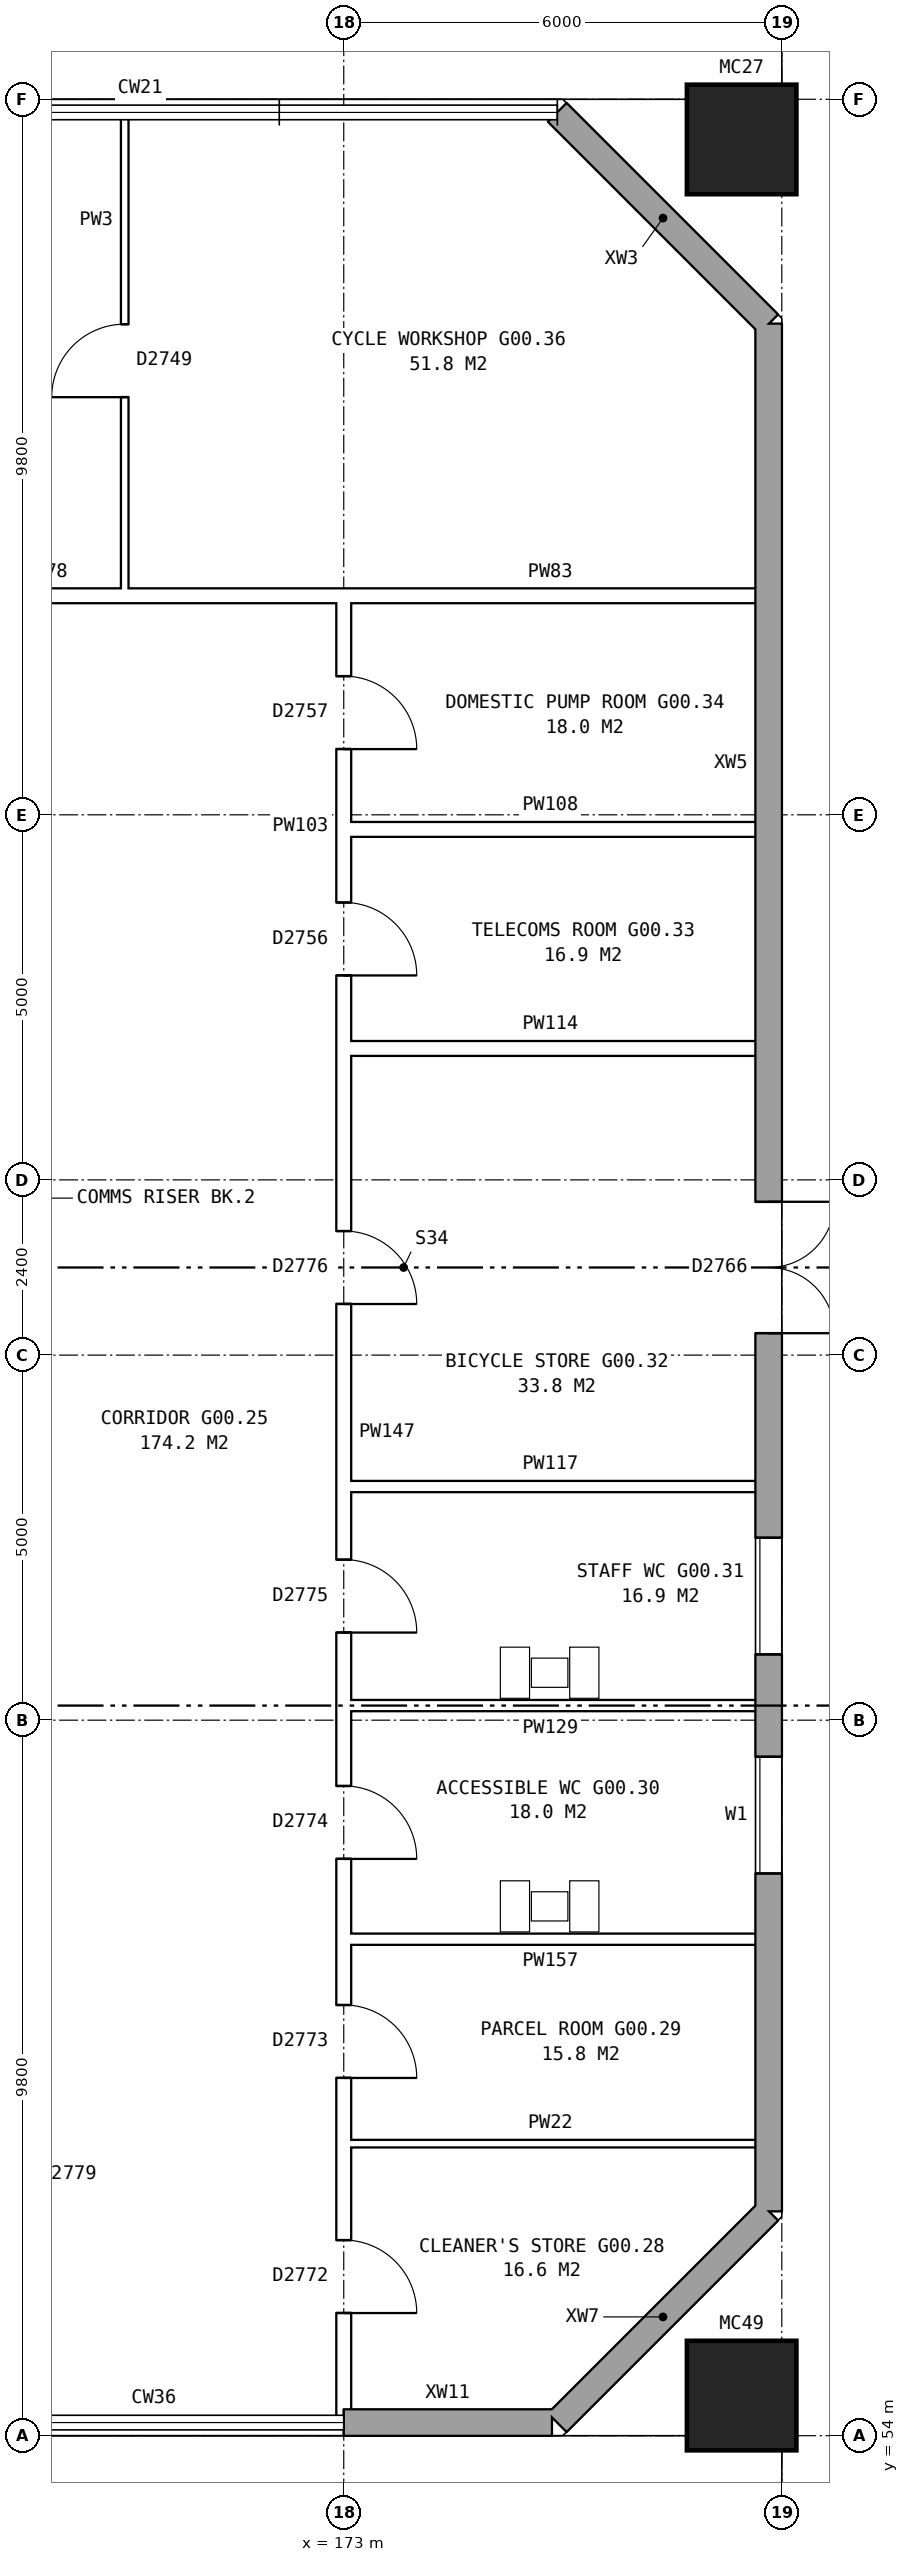
"""IFC4 building model, lengths in metres.
Left out: names, types, materials, properties, quantities, classifications, styles, units other than length and angle.
Written with IfcOpenShell. Run it as: python <this file> out.ifc"""

import sys

from ifc_helpers import new_model, si_unit, direction, frame, frame_2d, origin, origin_2d, place, context, subcontext, project, spatial, rectangle, hollow_rectangle, extrude, element, fill, save


model = new_model("IFC4")
c1 = context("Model", 3, precision=1e-05, world=origin(), true_north=direction((0.0, 1.0)))
c2 = subcontext(c1, "Body", "Model", "MODEL_VIEW")
j1 = project(units=[si_unit("LENGTHUNIT", "METRE"), si_unit("PLANEANGLEUNIT", "RADIAN")], contexts=[c1])
p1 = place(None, origin())
s1 = spatial("IfcSite", under=j1, at=p1, CompositionType="ELEMENT")
p2 = place(p1, origin())
s2 = spatial("IfcBuilding", under=s1, at=p2, CompositionType="ELEMENT")
p3 = place(p2, origin())
s3 = spatial("IfcBuildingStorey", under=s2, at=p3, CompositionType="ELEMENT", Elevation=0.0)
for number, where, z_axis, x_axis in (
    (1, (178.45, 54.55, -0.35), (0.0, 0.0, 1.0), (1.0, 0.0, 0.0)),
    (2, (178.45, 85.45, -0.35), (0.0, 0.0, 1.0), (1.0, 0.0, 0.0)),
):
    element("IfcColumn", number, at=place(p3, frame(where, z_axis=z_axis, x_axis=x_axis)), inside=s3, PredefinedType="COLUMN", context=c2, shape_type="SweptSolid", body=[
        extrude(hollow_rectangle(XDim=1.5, YDim=1.5, WallThickness=0.08, at=origin_2d()), origin(), (0.0, 0.0, 1.0), 5.85),
    ])
p4 = place(p3, frame((173.0, 54.18, 0.0), z_axis=(0.0, 0.0, 1.0), x_axis=(1.0, 0.0, 0.0)))
e3 = element("IfcWall", 3, at=p4, inside=s3, PredefinedType="STANDARD", context=c2, shape_type="SweptSolid", body=[
    extrude(rectangle(XDim=2.85, YDim=0.36, at=frame_2d((1.425, 0.0))), origin(), (0.0, 0.0, 1.0), 5.2),
])
p5 = place(p3, frame((175.925, 54.18, 0.0), z_axis=(0.0, 0.0, 1.0), x_axis=(0.707106781187, 0.707106781187, 0.0)))
e4 = element("IfcWall", 4, at=p5, inside=s3, PredefinedType="STANDARD", context=c2, shape_type="SweptSolid", body=[
    extrude(rectangle(XDim=4.094, YDim=0.36, at=frame_2d((2.047, 0.0))), origin(), (0.0, 0.0, 1.0), 5.2),
])
p6 = place(p3, frame((178.82, 57.075, 0.0), z_axis=(0.0, 0.0, 1.0), x_axis=(0.0, 1.0, 0.0)))
e5 = element("IfcWall", 5, at=p6, inside=s3, PredefinedType="STANDARD", context=c2, shape_type="SweptSolid", body=[
    extrude(rectangle(XDim=25.851, YDim=0.36, at=frame_2d((12.925, 0.0))), origin(), (0.0, 0.0, 1.0), 5.2),
])
p7 = place(p6, frame((4.625, 0.0, 0.8)))
e6 = element("IfcOpeningElement", 6, at=p7, cuts=e5, PredefinedType="OPENING", context=c2, shape_type="SweptSolid", body=[
    extrude(rectangle(XDim=1.6, YDim=1.8, at=frame_2d((0.8, 0.9))), frame((0.0, 0.19, 0.0), z_axis=(0.0, -1.0, 0.0), x_axis=(1.0, 0.0, 0.0)), (0.0, 0.0, 1.0), 0.38),
])
p8 = place(p6, frame((7.625, 0.0, 0.8)))
e7 = element("IfcOpeningElement", 7, at=p8, cuts=e5, PredefinedType="OPENING", context=c2, shape_type="SweptSolid", body=[
    extrude(rectangle(XDim=1.6, YDim=1.8, at=frame_2d((0.8, 0.9))), frame((0.0, 0.19, 0.0), z_axis=(0.0, -1.0, 0.0), x_axis=(1.0, 0.0, 0.0)), (0.0, 0.0, 1.0), 0.38),
])
p9 = place(p6, frame((12.025, 0.0, 0.0)))
e8 = element("IfcOpeningElement", 8, at=p9, cuts=e5, PredefinedType="OPENING", context=c2, shape_type="SweptSolid", body=[
    extrude(rectangle(XDim=1.8, YDim=2.4, at=frame_2d((0.9, 1.2))), frame((0.0, 0.19, 0.0), z_axis=(0.0, -1.0, 0.0), x_axis=(1.0, 0.0, 0.0)), (0.0, 0.0, 1.0), 0.38),
])
p10 = place(p3, frame((178.82, 82.925, 0.0), z_axis=(0.0, 0.0, 1.0), x_axis=(-0.707106781187, 0.707106781187, 0.0)))
e9 = element("IfcWall", 9, at=p10, inside=s3, PredefinedType="STANDARD", context=c2, shape_type="SweptSolid", body=[
    extrude(rectangle(XDim=4.094, YDim=0.36, at=frame_2d((2.047, 0.0))), origin(), (0.0, 0.0, 1.0), 5.2),
])
p11 = place(p3, frame((172.9, 58.0, 0.0), z_axis=(0.0, 0.0, 1.0), x_axis=(1.0, 0.0, 0.0)))
e10 = element("IfcWall", 10, at=p11, inside=s3, PredefinedType="PARTITIONING", context=c2, shape_type="SweptSolid", body=[
    extrude(rectangle(XDim=5.86, YDim=0.1, at=frame_2d((2.93, 0.0))), origin(), (0.0, 0.0, 1.0), 5.2),
])
for number, where, z_axis, x_axis in (
    (11, (172.9, 60.8, 0.0), (0.0, 0.0, 1.0), (1.0, 0.0, 0.0)),
    (12, (172.9, 64.0, 0.0), (0.0, 0.0, 1.0), (1.0, 0.0, 0.0)),
    (13, (172.9, 67.0, 0.0), (0.0, 0.0, 1.0), (1.0, 0.0, 0.0)),
):
    element("IfcWall", number, at=place(p3, frame(where, z_axis=z_axis, x_axis=x_axis)), inside=s3, PredefinedType="PLUMBINGWALL", context=c2, shape_type="SweptSolid", body=[
        extrude(rectangle(XDim=5.86, YDim=0.15, at=frame_2d((2.93, 0.0))), origin(), (0.0, 0.0, 1.0), 5.2),
    ])
for number, where, z_axis, x_axis in (
    (14, (172.9, 73.0, 0.0), (0.0, 0.0, 1.0), (1.0, 0.0, 0.0)),
    (15, (172.9, 76.0, 0.0), (0.0, 0.0, 1.0), (1.0, 0.0, 0.0)),
):
    element("IfcWall", number, at=place(p3, frame(where, z_axis=z_axis, x_axis=x_axis)), inside=s3, PredefinedType="PARTITIONING", context=c2, shape_type="SweptSolid", body=[
        extrude(rectangle(XDim=5.86, YDim=0.2, at=frame_2d((2.93, 0.0))), origin(), (0.0, 0.0, 1.0), 5.2),
    ])
p12 = place(p3, frame((172.898, 79.2, 0.0), z_axis=(0.0, 0.0, 1.0), x_axis=(1.0, 0.0, 0.0)))
e16 = element("IfcWall", 16, at=p12, inside=s3, PredefinedType="PARTITIONING", context=c2, shape_type="SweptSolid", body=[
    extrude(rectangle(XDim=5.862, YDim=0.2, at=frame_2d((2.931, 0.0))), origin(), (0.0, 0.0, 1.0), 5.2),
])
p13 = place(p3, frame((157.53, 79.2, 0.0), z_axis=(0.0, 0.0, 1.0), x_axis=(1.0, 0.0, 0.0)))
e17 = element("IfcWall", 17, at=p13, inside=s3, PredefinedType="PARTITIONING", context=c2, shape_type="SweptSolid", body=[
    extrude(rectangle(XDim=15.572, YDim=0.2, at=frame_2d((7.786, 0.0))), origin(), (0.0, 0.0, 1.0), 5.2),
])
p14 = place(p13, frame((5.395, 0.0, 0.0)))
e18 = element("IfcOpeningElement", 18, at=p14, cuts=e17, PredefinedType="OPENING", context=c2, shape_type="SweptSolid", body=[
    extrude(rectangle(XDim=1.8, YDim=2.1, at=frame_2d((0.9, 1.05))), frame((0.0, 0.11, 0.0), z_axis=(0.0, -1.0, 0.0), x_axis=(1.0, 0.0, 0.0)), (0.0, 0.0, 1.0), 0.22),
])
p15 = place(p3, frame((170.0, 79.1, 0.0), z_axis=(0.0, 0.0, 1.0), x_axis=(0.0, 1.0, 0.0)))
e19 = element("IfcWall", 19, at=p15, inside=s3, PredefinedType="PARTITIONING", context=c2, shape_type="SweptSolid", body=[
    extrude(rectangle(XDim=6.66, YDim=0.1, at=frame_2d((3.33, 0.0))), origin(), (0.0, 0.0, 1.0), 5.2),
])
p16 = place(p15, frame((2.82, 0.0, 0.0)))
e20 = element("IfcOpeningElement", 20, at=p16, cuts=e19, PredefinedType="OPENING", context=c2, shape_type="SweptSolid", body=[
    extrude(rectangle(XDim=1.0, YDim=2.1, at=frame_2d((0.5, 1.05))), frame((0.0, 0.06, 0.0), z_axis=(0.0, -1.0, 0.0), x_axis=(1.0, 0.0, 0.0)), (0.0, 0.0, 1.0), 0.12),
])
p17 = place(p3, frame((173.0, 72.9, 0.0), z_axis=(0.0, 0.0, 1.0), x_axis=(0.0, 1.0, 0.0)))
e21 = element("IfcWall", 21, at=p17, inside=s3, PredefinedType="PARTITIONING", context=c2, shape_type="SweptSolid", body=[
    extrude(rectangle(XDim=6.4, YDim=0.2, at=frame_2d((3.2, 0.0))), origin(), (0.0, 0.0, 1.0), 5.2),
])
p18 = place(p17, frame((1.1, 0.0, 0.0)))
e22 = element("IfcOpeningElement", 22, at=p18, cuts=e21, PredefinedType="OPENING", context=c2, shape_type="SweptSolid", body=[
    extrude(rectangle(XDim=1.0, YDim=2.1, at=frame_2d((0.5, 1.05))), frame((0.0, 0.11, 0.0), z_axis=(0.0, -1.0, 0.0), x_axis=(1.0, 0.0, 0.0)), (0.0, 0.0, 1.0), 0.22),
])
p19 = place(p17, frame((4.2, 0.0, 0.0)))
e23 = element("IfcOpeningElement", 23, at=p19, cuts=e21, PredefinedType="OPENING", context=c2, shape_type="SweptSolid", body=[
    extrude(rectangle(XDim=1.0, YDim=2.1, at=frame_2d((0.5, 1.05))), frame((0.0, 0.11, 0.0), z_axis=(0.0, -1.0, 0.0), x_axis=(1.0, 0.0, 0.0)), (0.0, 0.0, 1.0), 0.22),
])
p20 = place(p3, frame((173.0, 54.24, 0.0), z_axis=(0.0, 0.0, 1.0), x_axis=(0.0, 1.0, 0.0)))
e24 = element("IfcWall", 24, at=p20, inside=s3, PredefinedType="PARTITIONING", context=c2, shape_type="SweptSolid", body=[
    extrude(rectangle(XDim=18.86, YDim=0.2, at=frame_2d((9.43, 0.0))), origin(), (0.0, 0.0, 1.0), 5.2),
])
p21 = place(p20, frame((1.44, 0.0, 0.0)))
e25 = element("IfcOpeningElement", 25, at=p21, cuts=e24, PredefinedType="OPENING", context=c2, shape_type="SweptSolid", body=[
    extrude(rectangle(XDim=1.0, YDim=2.1, at=frame_2d((0.5, 1.05))), frame((0.0, 0.11, 0.0), z_axis=(0.0, -1.0, 0.0), x_axis=(1.0, 0.0, 0.0)), (0.0, 0.0, 1.0), 0.22),
])
p22 = place(p20, frame((4.66, 0.0, 0.0)))
e26 = element("IfcOpeningElement", 26, at=p22, cuts=e24, PredefinedType="OPENING", context=c2, shape_type="SweptSolid", body=[
    extrude(rectangle(XDim=1.0, YDim=2.1, at=frame_2d((0.5, 1.05))), frame((0.0, 0.11, 0.0), z_axis=(0.0, -1.0, 0.0), x_axis=(1.0, 0.0, 0.0)), (0.0, 0.0, 1.0), 0.22),
])
p23 = place(p20, frame((7.66, 0.0, 0.0)))
e27 = element("IfcOpeningElement", 27, at=p23, cuts=e24, PredefinedType="OPENING", context=c2, shape_type="SweptSolid", body=[
    extrude(rectangle(XDim=1.0, YDim=2.1, at=frame_2d((0.5, 1.05))), frame((0.0, 0.11, 0.0), z_axis=(0.0, -1.0, 0.0), x_axis=(1.0, 0.0, 0.0)), (0.0, 0.0, 1.0), 0.22),
])
p24 = place(p20, frame((10.76, 0.0, 0.0)))
e28 = element("IfcOpeningElement", 28, at=p24, cuts=e24, PredefinedType="OPENING", context=c2, shape_type="SweptSolid", body=[
    extrude(rectangle(XDim=1.0, YDim=2.1, at=frame_2d((0.5, 1.05))), frame((0.0, 0.11, 0.0), z_axis=(0.0, -1.0, 0.0), x_axis=(1.0, 0.0, 0.0)), (0.0, 0.0, 1.0), 0.22),
])
p25 = place(p20, frame((15.26, 0.0, 0.0)))
e29 = element("IfcOpeningElement", 29, at=p25, cuts=e24, PredefinedType="OPENING", context=c2, shape_type="SweptSolid", body=[
    extrude(rectangle(XDim=1.0, YDim=2.1, at=frame_2d((0.5, 1.05))), frame((0.0, 0.11, 0.0), z_axis=(0.0, -1.0, 0.0), x_axis=(1.0, 0.0, 0.0)), (0.0, 0.0, 1.0), 0.22),
])
p26 = place(p7, origin())
e30 = element("IfcWindow", 30, at=p26, inside=s3, PartitioningType="SINGLE_PANEL", PredefinedType="WINDOW", context=c2, shape_type="SweptSolid", body=[
    extrude(rectangle(XDim=1.6, YDim=1.8, at=frame_2d((0.8, 0.9))), frame((0.0, 0.15, 0.0), z_axis=(0.0, -1.0, 0.0), x_axis=(1.0, 0.0, 0.0)), (0.0, 0.0, 1.0), 0.06),
])
fill(e6, e30)
p27 = place(p8, origin())
e31 = element("IfcWindow", 31, at=p27, inside=s3, PartitioningType="SINGLE_PANEL", PredefinedType="WINDOW", context=c2, shape_type="SweptSolid", body=[
    extrude(rectangle(XDim=1.6, YDim=1.8, at=frame_2d((0.8, 0.9))), frame((0.0, 0.15, 0.0), z_axis=(0.0, -1.0, 0.0), x_axis=(1.0, 0.0, 0.0)), (0.0, 0.0, 1.0), 0.06),
])
fill(e7, e31)
p28 = place(p9, frame((1.8, 0.0, 0.0), z_axis=(0.0, 0.0, 1.0), x_axis=(-1.0, 0.0, 0.0)))
e32 = element("IfcDoor", 32, at=p28, inside=s3, OperationType="DOUBLE_DOOR_SINGLE_SWING", PredefinedType="DOOR", context=c2, shape_type="SweptSolid", body=[
    extrude(rectangle(XDim=1.8, YDim=2.4, at=frame_2d((0.9, 1.2))), frame((0.0, 0.025, 0.0), z_axis=(0.0, -1.0, 0.0), x_axis=(1.0, 0.0, 0.0)), (0.0, 0.0, 1.0), 0.05),
])
fill(e8, e32)
p29 = place(p16, origin())
e33 = element("IfcDoor", 33, at=p29, inside=s3, OperationType="SINGLE_SWING_LEFT", PredefinedType="DOOR", context=c2, shape_type="SweptSolid", body=[
    extrude(rectangle(XDim=1.0, YDim=2.1, at=frame_2d((0.5, 1.05))), frame((0.0, 0.025, 0.0), z_axis=(0.0, -1.0, 0.0), x_axis=(1.0, 0.0, 0.0)), (0.0, 0.0, 1.0), 0.05),
])
fill(e20, e33)
p30 = place(p18, frame((1.0, 0.0, 0.0), z_axis=(0.0, 0.0, 1.0), x_axis=(-1.0, 0.0, 0.0)))
e34 = element("IfcDoor", 34, at=p30, inside=s3, OperationType="SINGLE_SWING_RIGHT", PredefinedType="DOOR", context=c2, shape_type="SweptSolid", body=[
    extrude(rectangle(XDim=1.0, YDim=2.1, at=frame_2d((0.5, 1.05))), frame((0.0, 0.025, 0.0), z_axis=(0.0, -1.0, 0.0), x_axis=(1.0, 0.0, 0.0)), (0.0, 0.0, 1.0), 0.05),
])
fill(e22, e34)
p31 = place(p19, frame((1.0, 0.0, 0.0), z_axis=(0.0, 0.0, 1.0), x_axis=(-1.0, 0.0, 0.0)))
e35 = element("IfcDoor", 35, at=p31, inside=s3, OperationType="SINGLE_SWING_RIGHT", PredefinedType="DOOR", context=c2, shape_type="SweptSolid", body=[
    extrude(rectangle(XDim=1.0, YDim=2.1, at=frame_2d((0.5, 1.05))), frame((0.0, 0.025, 0.0), z_axis=(0.0, -1.0, 0.0), x_axis=(1.0, 0.0, 0.0)), (0.0, 0.0, 1.0), 0.05),
])
fill(e23, e35)
p32 = place(p21, frame((1.0, 0.0, 0.0), z_axis=(0.0, 0.0, 1.0), x_axis=(-1.0, 0.0, 0.0)))
e36 = element("IfcDoor", 36, at=p32, inside=s3, OperationType="SINGLE_SWING_RIGHT", PredefinedType="DOOR", context=c2, shape_type="SweptSolid", body=[
    extrude(rectangle(XDim=1.0, YDim=2.1, at=frame_2d((0.5, 1.05))), frame((0.0, 0.025, 0.0), z_axis=(0.0, -1.0, 0.0), x_axis=(1.0, 0.0, 0.0)), (0.0, 0.0, 1.0), 0.05),
])
fill(e25, e36)
p33 = place(p22, frame((1.0, 0.0, 0.0), z_axis=(0.0, 0.0, 1.0), x_axis=(-1.0, 0.0, 0.0)))
e37 = element("IfcDoor", 37, at=p33, inside=s3, OperationType="SINGLE_SWING_RIGHT", PredefinedType="DOOR", context=c2, shape_type="SweptSolid", body=[
    extrude(rectangle(XDim=1.0, YDim=2.1, at=frame_2d((0.5, 1.05))), frame((0.0, 0.025, 0.0), z_axis=(0.0, -1.0, 0.0), x_axis=(1.0, 0.0, 0.0)), (0.0, 0.0, 1.0), 0.05),
])
fill(e26, e37)
p34 = place(p23, frame((1.0, 0.0, 0.0), z_axis=(0.0, 0.0, 1.0), x_axis=(-1.0, 0.0, 0.0)))
e38 = element("IfcDoor", 38, at=p34, inside=s3, OperationType="SINGLE_SWING_RIGHT", PredefinedType="DOOR", context=c2, shape_type="SweptSolid", body=[
    extrude(rectangle(XDim=1.0, YDim=2.1, at=frame_2d((0.5, 1.05))), frame((0.0, 0.025, 0.0), z_axis=(0.0, -1.0, 0.0), x_axis=(1.0, 0.0, 0.0)), (0.0, 0.0, 1.0), 0.05),
])
fill(e27, e38)
p35 = place(p24, frame((1.0, 0.0, 0.0), z_axis=(0.0, 0.0, 1.0), x_axis=(-1.0, 0.0, 0.0)))
e39 = element("IfcDoor", 39, at=p35, inside=s3, OperationType="SINGLE_SWING_RIGHT", PredefinedType="DOOR", context=c2, shape_type="SweptSolid", body=[
    extrude(rectangle(XDim=1.0, YDim=2.1, at=frame_2d((0.5, 1.05))), frame((0.0, 0.025, 0.0), z_axis=(0.0, -1.0, 0.0), x_axis=(1.0, 0.0, 0.0)), (0.0, 0.0, 1.0), 0.05),
])
fill(e28, e39)
p36 = place(p25, frame((1.0, 0.0, 0.0), z_axis=(0.0, 0.0, 1.0), x_axis=(-1.0, 0.0, 0.0)))
e40 = element("IfcDoor", 40, at=p36, inside=s3, OperationType="SINGLE_SWING_RIGHT", PredefinedType="DOOR", context=c2, shape_type="SweptSolid", body=[
    extrude(rectangle(XDim=1.0, YDim=2.1, at=frame_2d((0.5, 1.05))), frame((0.0, 0.025, 0.0), z_axis=(0.0, -1.0, 0.0), x_axis=(1.0, 0.0, 0.0)), (0.0, 0.0, 1.0), 0.05),
])
fill(e29, e40)
save(model, sys.argv[1])
